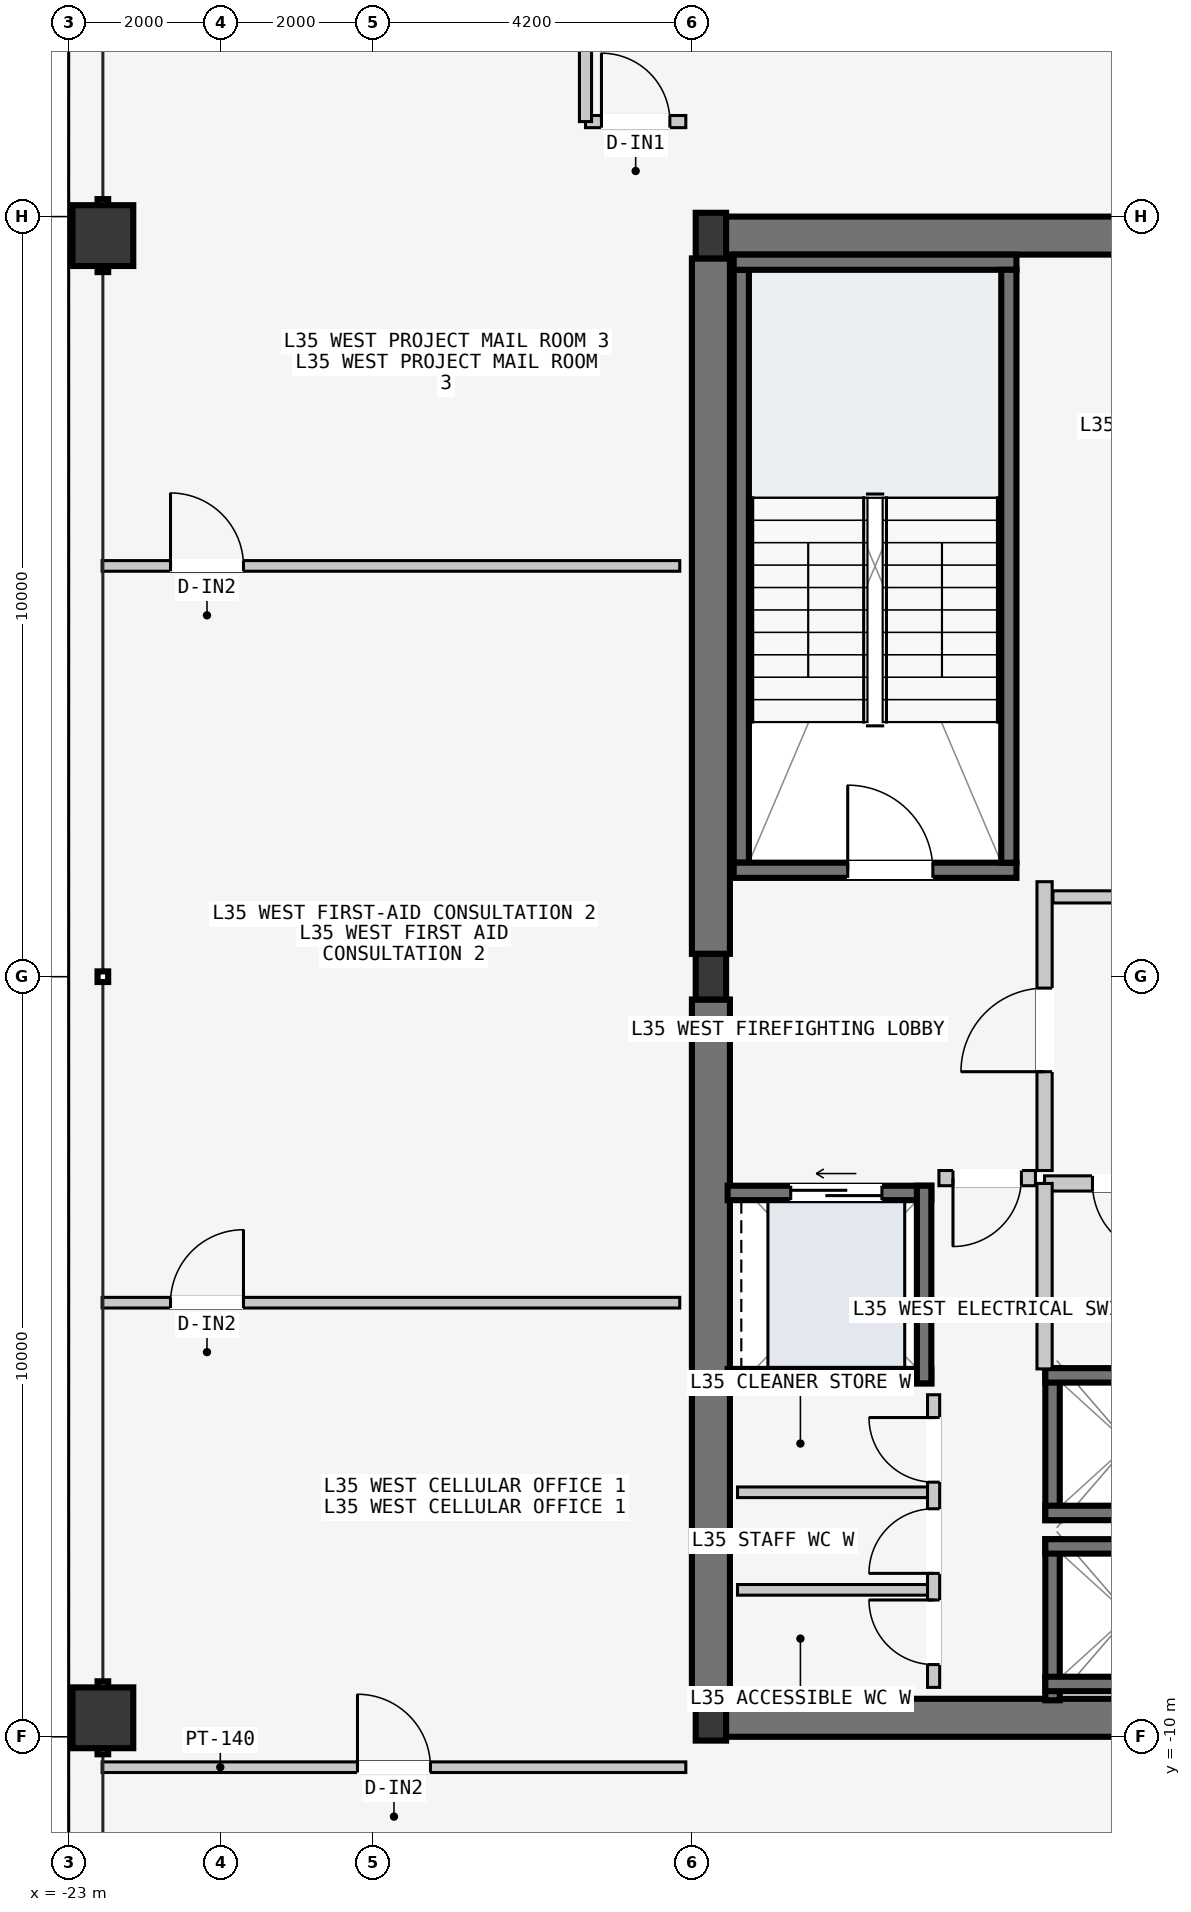
"""IFC4 building model, lengths in metres.
Left out: names, types, materials, properties, quantities, classifications, styles, units other than length and angle.
Written with IfcOpenShell. Run it as: python <this file> out.ifc"""

import sys

from ifc_helpers import new_model, si_unit, direction, frame, frame_2d, origin, origin_2d, place, context, subcontext, project, spatial, rectangle, hollow_rectangle, i_section, extrude, element, fill, save


model = new_model("IFC4")
c1 = context("Model", 3, precision=1e-05, world=origin(), true_north=direction((0.0, 1.0)))
c2 = subcontext(c1, "Body", "Model", "MODEL_VIEW")
j1 = project(units=[si_unit("LENGTHUNIT", "METRE"), si_unit("PLANEANGLEUNIT", "RADIAN")], contexts=[c1])
p1 = place(None, origin())
s1 = spatial("IfcSite", under=j1, at=p1, CompositionType="ELEMENT")
p2 = place(p1, origin())
s2 = spatial("IfcBuilding", under=s1, at=p2, CompositionType="ELEMENT")
p3 = place(p2, frame((0.0, 0.0, 135.0)))
s3 = spatial("IfcBuildingStorey", under=s2, at=p3, CompositionType="ELEMENT", Elevation=135.0)
for number, where, z_axis, x_axis in (
    (1, (-14.53, -9.75, -0.2), (0.0, 0.0, 1.0), (1.0, 0.0, 0.0)),
    (2, (-14.53, 9.75, -0.2), (0.0, 0.0, 1.0), (1.0, 0.0, 0.0)),
):
    element("IfcWall", number, at=place(p3, frame(where, z_axis=z_axis, x_axis=x_axis)), inside=s3, PredefinedType="SHEAR", context=c2, shape_type="SweptSolid", body=[
        extrude(rectangle(XDim=6.46, YDim=0.5, at=frame_2d((3.23, 0.0))), origin(), (0.0, 0.0, 1.0), 3.6),
    ])
for number, where, z_axis, x_axis in (
    (3, (-14.55, -9.45, -0.2), (0.0, 0.0, 1.0), (0.0, 1.0, 0.0)),
    (4, (-14.55, 0.3, -0.2), (0.0, 0.0, 1.0), (0.0, 1.0, 0.0)),
):
    element("IfcWall", number, at=place(p3, frame(where, z_axis=z_axis, x_axis=x_axis)), inside=s3, PredefinedType="SHEAR", context=c2, shape_type="SweptSolid", body=[
        extrude(rectangle(XDim=9.15, YDim=0.5, at=frame_2d((4.575, 0.0))), origin(), (0.0, 0.0, 1.0), 3.6),
    ])
p4 = place(p3, frame((-14.15, 1.5, -0.2), z_axis=(0.0, 0.0, 1.0), x_axis=(0.0, 1.0, 0.0)))
e5 = element("IfcWall", 5, at=p4, inside=s3, PredefinedType="SOLIDWALL", context=c2, shape_type="SweptSolid", body=[
    extrude(rectangle(XDim=7.8, YDim=0.2, at=frame_2d((3.9, 0.0))), origin(), (0.0, 0.0, 1.0), 3.6),
])
p5 = place(p3, frame((-14.25, 1.4, -0.2), z_axis=(0.0, 0.0, 1.0), x_axis=(1.0, 0.0, 0.0)))
e6 = element("IfcWall", 6, at=p5, inside=s3, PredefinedType="SOLIDWALL", context=c2, shape_type="SweptSolid", body=[
    extrude(rectangle(XDim=3.72, YDim=0.2, at=frame_2d((1.86, 0.0))), origin(), (0.0, 0.0, 1.0), 3.6),
])
p6 = place(p5, frame((1.5, 0.0, 0.2)))
e7 = element("IfcOpeningElement", 7, at=p6, cuts=e6, PredefinedType="OPENING", context=c2, shape_type="SweptSolid", body=[
    extrude(rectangle(XDim=1.12, YDim=2.18, at=frame_2d((0.56, 1.09))), frame((0.0, 0.11, 0.0), z_axis=(0.0, -1.0, 0.0), x_axis=(1.0, 0.0, 0.0)), (0.0, 0.0, 1.0), 0.22),
])
p7 = place(p3, frame((-14.25, 9.4, -0.2), z_axis=(0.0, 0.0, 1.0), x_axis=(1.0, 0.0, 0.0)))
e8 = element("IfcWall", 8, at=p7, inside=s3, PredefinedType="SOLIDWALL", context=c2, shape_type="SweptSolid", body=[
    extrude(rectangle(XDim=3.72, YDim=0.2, at=frame_2d((1.86, 0.0))), origin(), (0.0, 0.0, 1.0), 3.6),
])
p8 = place(p3, frame((-10.63, 1.5, -0.2), z_axis=(0.0, 0.0, 1.0), x_axis=(0.0, 1.0, 0.0)))
e9 = element("IfcWall", 9, at=p8, inside=s3, PredefinedType="SOLIDWALL", context=c2, shape_type="SweptSolid", body=[
    extrude(rectangle(XDim=7.8, YDim=0.2, at=frame_2d((3.9, 0.0))), origin(), (0.0, 0.0, 1.0), 3.6),
])
for number, where, z_axis, x_axis in (
    (10, (-14.55, -9.75, 0.0), (0.0, 0.0, 1.0), (1.0, 0.0, 0.0)),
    (11, (-14.55, 0.0, 0.0), (0.0, 0.0, 1.0), (1.0, 0.0, 0.0)),
    (12, (-14.55, 9.75, 0.0), (0.0, 0.0, 1.0), (1.0, 0.0, 0.0)),
):
    element("IfcColumn", number, at=place(p3, frame(where, z_axis=z_axis, x_axis=x_axis)), inside=s3, PredefinedType="COLUMN", context=c2, shape_type="SweptSolid", body=[
        extrude(i_section(OverallWidth=0.4, OverallDepth=0.6, WebThickness=0.022, FlangeThickness=0.036, at=origin_2d()), origin(), (0.0, 0.0, 1.0), 3.6),
    ])
for number, where, z_axis, x_axis in (
    (13, (-22.55, -9.75, 0.0), (0.0, 0.0, 1.0), (0.0, 1.0, 0.0)),
    (14, (-22.55, 9.75, 0.0), (0.0, 0.0, 1.0), (0.0, 1.0, 0.0)),
):
    element("IfcColumn", number, at=place(p3, frame(where, z_axis=z_axis, x_axis=x_axis)), inside=s3, PredefinedType="COLUMN", context=c2, shape_type="SweptSolid", body=[
        extrude(hollow_rectangle(XDim=0.8, YDim=0.8, WallThickness=0.036, at=origin_2d()), origin(), (0.0, 0.0, 1.0), 3.6),
    ])
p9 = place(p3, frame((-10.055, -9.52, -0.2), z_axis=(0.0, 0.0, 1.0), x_axis=(0.0, 1.0, 0.0)))
e15 = element("IfcWall", 15, at=p9, inside=s3, PredefinedType="SOLIDWALL", context=c2, shape_type="SweptSolid", body=[
    extrude(rectangle(XDim=2.12, YDim=0.19, at=frame_2d((1.06, 0.0))), origin(), (0.0, 0.0, 1.0), 3.6),
])
for number, where, z_axis, x_axis in (
    (16, (-10.15, -7.495, -0.2), (0.0, 0.0, 1.0), (1.0, 0.0, 0.0)),
    (17, (-10.15, -9.305, -0.2), (0.0, 0.0, 1.0), (1.0, 0.0, 0.0)),
):
    element("IfcWall", number, at=place(p3, frame(where, z_axis=z_axis, x_axis=x_axis)), inside=s3, PredefinedType="SOLIDWALL", context=c2, shape_type="SweptSolid", body=[
        extrude(rectangle(XDim=2.2, YDim=0.19, at=frame_2d((1.1, 0.0))), origin(), (0.0, 0.0, 1.0), 3.6),
    ])
p10 = place(p3, frame((-10.055, -7.15, -0.2), z_axis=(0.0, 0.0, 1.0), x_axis=(0.0, 1.0, 0.0)))
e18 = element("IfcWall", 18, at=p10, inside=s3, PredefinedType="SOLIDWALL", context=c2, shape_type="SweptSolid", body=[
    extrude(rectangle(XDim=2.0, YDim=0.19, at=frame_2d((1.0, 0.0))), origin(), (0.0, 0.0, 1.0), 3.6),
])
for number, where, z_axis, x_axis in (
    (19, (-10.15, -5.245, -0.2), (0.0, 0.0, 1.0), (1.0, 0.0, 0.0)),
    (20, (-10.15, -7.055, -0.2), (0.0, 0.0, 1.0), (1.0, 0.0, 0.0)),
):
    element("IfcWall", number, at=place(p3, frame(where, z_axis=z_axis, x_axis=x_axis)), inside=s3, PredefinedType="SOLIDWALL", context=c2, shape_type="SweptSolid", body=[
        extrude(rectangle(XDim=2.2, YDim=0.19, at=frame_2d((1.1, 0.0))), origin(), (0.0, 0.0, 1.0), 3.6),
    ])
p11 = place(p3, frame((-14.33, -2.845, -0.2), z_axis=(0.0, 0.0, 1.0), x_axis=(1.0, 0.0, 0.0)))
e21 = element("IfcWall", 21, at=p11, inside=s3, PredefinedType="SOLIDWALL", context=c2, shape_type="SweptSolid", body=[
    extrude(rectangle(XDim=2.68, YDim=0.19, at=frame_2d((1.34, 0.0))), origin(), (0.0, 0.0, 1.0), 3.6),
])
p12 = place(p11, frame((0.83, 0.0, 0.2)))
e22 = element("IfcOpeningElement", 22, at=p12, cuts=e21, PredefinedType="OPENING", context=c2, shape_type="SweptSolid", body=[
    extrude(rectangle(XDim=1.2, YDim=2.2, at=frame_2d((0.6, 1.1))), frame((0.0, 0.105, 0.0), z_axis=(0.0, -1.0, 0.0), x_axis=(1.0, 0.0, 0.0)), (0.0, 0.0, 1.0), 0.21),
])
p13 = place(p3, frame((-14.33, -5.255, -0.2), z_axis=(0.0, 0.0, 1.0), x_axis=(1.0, 0.0, 0.0)))
e23 = element("IfcWall", 23, at=p13, inside=s3, PredefinedType="SOLIDWALL", context=c2, shape_type="SweptSolid", body=[
    extrude(rectangle(XDim=2.68, YDim=0.19, at=frame_2d((1.34, 0.0))), origin(), (0.0, 0.0, 1.0), 3.6),
])
p14 = place(p3, frame((-11.745, -5.35, -0.2), z_axis=(0.0, 0.0, 1.0), x_axis=(0.0, 1.0, 0.0)))
e24 = element("IfcWall", 24, at=p14, inside=s3, PredefinedType="SOLIDWALL", context=c2, shape_type="SweptSolid", body=[
    extrude(rectangle(XDim=2.6, YDim=0.19, at=frame_2d((1.3, 0.0))), origin(), (0.0, 0.0, 1.0), 3.6),
])
p15 = place(p3, frame((-10.16, -2.55, 0.0), z_axis=(0.0, 0.0, 1.0), x_axis=(0.0, 1.0, 0.0)))
e25 = element("IfcWall", 25, at=p15, inside=s3, PredefinedType="PARTITIONING", context=c2, shape_type="SweptSolid", body=[
    extrude(rectangle(XDim=3.8, YDim=0.2, at=frame_2d((1.9, 0.0))), origin(), (0.0, 0.0, 1.0), 3.4),
])
p16 = place(p15, frame((1.3, 0.0, 0.0)))
e26 = element("IfcOpeningElement", 26, at=p16, cuts=e25, PredefinedType="OPENING", context=c2, shape_type="SweptSolid", body=[
    extrude(rectangle(XDim=1.1, YDim=2.15, at=frame_2d((0.55, 1.075))), frame((0.0, 0.11, 0.0), z_axis=(0.0, -1.0, 0.0), x_axis=(1.0, 0.0, 0.0)), (0.0, 0.0, 1.0), 0.22),
])
p17 = place(p3, frame((-10.28, -2.65, 0.0), z_axis=(0.0, 0.0, 1.0), x_axis=(-1.0, 0.0, 0.0)))
e27 = element("IfcWall", 27, at=p17, inside=s3, PredefinedType="PARTITIONING", context=c2, shape_type="SweptSolid", body=[
    extrude(rectangle(XDim=1.27, YDim=0.2, at=frame_2d((0.635, 0.0))), origin(), (0.0, 0.0, 1.0), 3.4),
])
p18 = place(p17, frame((0.185, 0.0, 0.0)))
e28 = element("IfcOpeningElement", 28, at=p18, cuts=e27, PredefinedType="OPENING", context=c2, shape_type="SweptSolid", body=[
    extrude(rectangle(XDim=0.9, YDim=2.15, at=frame_2d((0.45, 1.075))), frame((0.0, 0.11, 0.0), z_axis=(0.0, -1.0, 0.0), x_axis=(1.0, 0.0, 0.0)), (0.0, 0.0, 1.0), 0.22),
])
p19 = place(p3, frame((-7.96, -2.72, 0.0), z_axis=(0.0, 0.0, 1.0), x_axis=(-1.0, 0.0, 0.0)))
e29 = element("IfcWall", 29, at=p19, inside=s3, PredefinedType="PARTITIONING", context=c2, shape_type="SweptSolid", body=[
    extrude(rectangle(XDim=2.2, YDim=0.2, at=frame_2d((1.1, 0.0))), origin(), (0.0, 0.0, 1.0), 3.4),
])
p20 = place(p19, frame((0.62, 0.0, 0.0)))
e30 = element("IfcOpeningElement", 30, at=p20, cuts=e29, PredefinedType="OPENING", context=c2, shape_type="SweptSolid", body=[
    extrude(rectangle(XDim=0.95, YDim=2.1, at=frame_2d((0.475, 1.05))), frame((0.0, 0.11, 0.0), z_axis=(0.0, -1.0, 0.0), x_axis=(1.0, 0.0, 0.0)), (0.0, 0.0, 1.0), 0.22),
])
p21 = place(p3, frame((-10.16, -5.16, 0.0), z_axis=(0.0, 0.0, 1.0), x_axis=(0.0, 1.0, 0.0)))
e31 = element("IfcWall", 31, at=p21, inside=s3, PredefinedType="PARTITIONING", context=c2, shape_type="SweptSolid", body=[
    extrude(rectangle(XDim=2.44, YDim=0.2, at=frame_2d((1.22, 0.0))), origin(), (0.0, 0.0, 1.0), 3.4),
])
for number, where, z_axis, x_axis in (
    (32, (-11.7, -8.067, 0.0), (0.0, 0.0, 1.0), (-1.0, 0.0, 0.0)),
    (33, (-11.7, -6.783, 0.0), (0.0, 0.0, 1.0), (-1.0, 0.0, 0.0)),
):
    element("IfcWall", number, at=place(p3, frame(where, z_axis=z_axis, x_axis=x_axis)), inside=s3, PredefinedType="PARTITIONING", context=c2, shape_type="SweptSolid", body=[
        extrude(rectangle(XDim=2.5, YDim=0.14, at=frame_2d((1.25, 0.0))), origin(), (0.0, 0.0, 1.0), 3.4),
    ])
p22 = place(p3, frame((-11.62, -9.35, 0.0), z_axis=(0.0, 0.0, 1.0), x_axis=(0.0, 1.0, 0.0)))
e34 = element("IfcWall", 34, at=p22, inside=s3, PredefinedType="PARTITIONING", context=c2, shape_type="SweptSolid", body=[
    extrude(rectangle(XDim=3.85, YDim=0.16, at=frame_2d((1.925, 0.0))), origin(), (0.0, 0.0, 1.0), 3.4),
])
p23 = place(p22, frame((0.3, 0.0, 0.0)))
e35 = element("IfcOpeningElement", 35, at=p23, cuts=e34, PredefinedType="OPENING", context=c2, shape_type="SweptSolid", body=[
    extrude(rectangle(XDim=0.85, YDim=2.12, at=frame_2d((0.425, 1.06))), frame((0.0, 0.09, 0.0), z_axis=(0.0, -1.0, 0.0), x_axis=(1.0, 0.0, 0.0)), (0.0, 0.0, 1.0), 0.18),
])
p24 = place(p22, frame((1.5, 0.0, 0.0)))
e36 = element("IfcOpeningElement", 36, at=p24, cuts=e34, PredefinedType="OPENING", context=c2, shape_type="SweptSolid", body=[
    extrude(rectangle(XDim=0.85, YDim=2.12, at=frame_2d((0.425, 1.06))), frame((0.0, 0.09, 0.0), z_axis=(0.0, -1.0, 0.0), x_axis=(1.0, 0.0, 0.0)), (0.0, 0.0, 1.0), 0.18),
])
p25 = place(p22, frame((2.7, 0.0, 0.0)))
e37 = element("IfcOpeningElement", 37, at=p25, cuts=e34, PredefinedType="OPENING", context=c2, shape_type="SweptSolid", body=[
    extrude(rectangle(XDim=0.85, YDim=2.12, at=frame_2d((0.425, 1.06))), frame((0.0, 0.09, 0.0), z_axis=(0.0, -1.0, 0.0), x_axis=(1.0, 0.0, 0.0)), (0.0, 0.0, 1.0), 0.18),
])
p26 = place(p3, frame((-10.05, 1.05, 0.0), z_axis=(0.0, 0.0, 1.0), x_axis=(1.0, 0.0, 0.0)))
e38 = element("IfcWall", 38, at=p26, inside=s3, PredefinedType="PARTITIONING", context=c2, shape_type="SweptSolid", body=[
    extrude(rectangle(XDim=6.21, YDim=0.16, at=frame_2d((3.105, 0.0))), origin(), (0.0, 0.0, 1.0), 3.4),
])
p27 = place(p3, frame((-22.56, -10.4, 0.0), z_axis=(0.0, 0.0, 1.0), x_axis=(1.0, 0.0, 0.0)))
e39 = element("IfcWall", 39, at=p27, inside=s3, PredefinedType="PARTITIONING", context=c2, shape_type="SweptSolid", body=[
    extrude(rectangle(XDim=7.68, YDim=0.14, at=frame_2d((3.84, 0.0))), origin(), (0.0, 0.0, 1.0), 3.4),
])
p28 = place(p27, frame((3.36, 0.0, 0.0)))
e40 = element("IfcOpeningElement", 40, at=p28, cuts=e39, PredefinedType="OPENING", context=c2, shape_type="SweptSolid", body=[
    extrude(rectangle(XDim=0.96, YDim=2.18, at=frame_2d((0.48, 1.09))), frame((0.0, 0.08, 0.0), z_axis=(0.0, -1.0, 0.0), x_axis=(1.0, 0.0, 0.0)), (0.0, 0.0, 1.0), 0.16),
])
p29 = place(p3, frame((-16.2, 11.25, 0.0), z_axis=(0.0, 0.0, 1.0), x_axis=(1.0, 0.0, 0.0)))
e41 = element("IfcWall", 41, at=p29, inside=s3, PredefinedType="PARTITIONING", context=c2, shape_type="SweptSolid", body=[
    extrude(rectangle(XDim=1.32, YDim=0.16, at=frame_2d((0.66, 0.0))), origin(), (0.0, 0.0, 1.0), 3.4),
])
p30 = place(p29, frame((0.21, 0.0, 0.0)))
e42 = element("IfcOpeningElement", 42, at=p30, cuts=e41, PredefinedType="OPENING", context=c2, shape_type="SweptSolid", body=[
    extrude(rectangle(XDim=0.9, YDim=2.15, at=frame_2d((0.45, 1.075))), frame((0.0, 0.09, 0.0), z_axis=(0.0, -1.0, 0.0), x_axis=(1.0, 0.0, 0.0)), (0.0, 0.0, 1.0), 0.18),
])
p31 = place(p3, frame((-16.2, 11.25, 0.0), z_axis=(0.0, 0.0, 1.0), x_axis=(0.0, 1.0, 0.0)))
e43 = element("IfcWall", 43, at=p31, inside=s3, PredefinedType="PARTITIONING", context=c2, shape_type="SweptSolid", body=[
    extrude(rectangle(XDim=1.95, YDim=0.16, at=frame_2d((0.975, 0.0))), origin(), (0.0, 0.0, 1.0), 3.4),
])
p32 = place(p3, frame((-22.56, -4.289, 0.0), z_axis=(0.0, 0.0, 1.0), x_axis=(1.0, 0.0, 0.0)))
e44 = element("IfcWall", 44, at=p32, inside=s3, PredefinedType="PARTITIONING", context=c2, shape_type="SweptSolid", body=[
    extrude(rectangle(XDim=7.6, YDim=0.14, at=frame_2d((3.8, 0.0))), origin(), (0.0, 0.0, 1.0), 3.4),
])
p33 = place(p32, frame((0.9, 0.0, 0.0)))
e45 = element("IfcOpeningElement", 45, at=p33, cuts=e44, PredefinedType="OPENING", context=c2, shape_type="SweptSolid", body=[
    extrude(rectangle(XDim=0.96, YDim=2.18, at=frame_2d((0.48, 1.09))), frame((0.0, 0.08, 0.0), z_axis=(0.0, -1.0, 0.0), x_axis=(1.0, 0.0, 0.0)), (0.0, 0.0, 1.0), 0.16),
])
p34 = place(p3, frame((-22.56, 5.404, 0.0), z_axis=(0.0, 0.0, 1.0), x_axis=(1.0, 0.0, 0.0)))
e46 = element("IfcWall", 46, at=p34, inside=s3, PredefinedType="PARTITIONING", context=c2, shape_type="SweptSolid", body=[
    extrude(rectangle(XDim=7.6, YDim=0.14, at=frame_2d((3.8, 0.0))), origin(), (0.0, 0.0, 1.0), 3.4),
])
p35 = place(p34, frame((0.9, 0.0, 0.0)))
e47 = element("IfcOpeningElement", 47, at=p35, cuts=e46, PredefinedType="OPENING", context=c2, shape_type="SweptSolid", body=[
    extrude(rectangle(XDim=0.96, YDim=2.18, at=frame_2d((0.48, 1.09))), frame((0.0, 0.08, 0.0), z_axis=(0.0, -1.0, 0.0), x_axis=(1.0, 0.0, 0.0)), (0.0, 0.0, 1.0), 0.16),
])
p36 = place(p6, origin())
e48 = element("IfcDoor", 48, at=p36, inside=s3, OperationType="SINGLE_SWING_LEFT", PredefinedType="DOOR", context=c2, shape_type="SweptSolid", body=[
    extrude(rectangle(XDim=1.12, YDim=2.18, at=frame_2d((0.56, 1.09))), frame((0.0, 0.025, 0.0), z_axis=(0.0, -1.0, 0.0), x_axis=(1.0, 0.0, 0.0)), (0.0, 0.0, 1.0), 0.05),
])
fill(e7, e48)
p37 = place(p12, origin())
e49 = element("IfcDoor", 49, at=p37, inside=s3, OperationType="SLIDING_TO_LEFT", PredefinedType="DOOR", context=c2, shape_type="SweptSolid", body=[
    extrude(rectangle(XDim=1.2, YDim=2.2, at=frame_2d((0.6, 1.1))), frame((0.0, 0.025, 0.0), z_axis=(0.0, -1.0, 0.0), x_axis=(1.0, 0.0, 0.0)), (0.0, 0.0, 1.0), 0.05),
])
fill(e22, e49)
p38 = place(p16, origin())
e50 = element("IfcDoor", 50, at=p38, inside=s3, OperationType="SINGLE_SWING_LEFT", PredefinedType="DOOR", context=c2, shape_type="SweptSolid", body=[
    extrude(rectangle(XDim=1.1, YDim=2.15, at=frame_2d((0.55, 1.075))), frame((0.0, 0.025, 0.0), z_axis=(0.0, -1.0, 0.0), x_axis=(1.0, 0.0, 0.0)), (0.0, 0.0, 1.0), 0.05),
])
fill(e26, e50)
p39 = place(p18, origin())
e51 = element("IfcDoor", 51, at=p39, inside=s3, OperationType="SINGLE_SWING_RIGHT", PredefinedType="DOOR", context=c2, shape_type="SweptSolid", body=[
    extrude(rectangle(XDim=0.9, YDim=2.15, at=frame_2d((0.45, 1.075))), frame((0.0, 0.025, 0.0), z_axis=(0.0, -1.0, 0.0), x_axis=(1.0, 0.0, 0.0)), (0.0, 0.0, 1.0), 0.05),
])
fill(e28, e51)
p40 = place(p20, origin())
e52 = element("IfcDoor", 52, at=p40, inside=s3, OperationType="SINGLE_SWING_LEFT", PredefinedType="DOOR", context=c2, shape_type="SweptSolid", body=[
    extrude(rectangle(XDim=0.95, YDim=2.1, at=frame_2d((0.475, 1.05))), frame((0.0, 0.025, 0.0), z_axis=(0.0, -1.0, 0.0), x_axis=(1.0, 0.0, 0.0)), (0.0, 0.0, 1.0), 0.05),
])
fill(e30, e52)
p41 = place(p23, origin())
e53 = element("IfcDoor", 53, at=p41, inside=s3, OperationType="SINGLE_SWING_RIGHT", PredefinedType="DOOR", context=c2, shape_type="SweptSolid", body=[
    extrude(rectangle(XDim=0.85, YDim=2.12, at=frame_2d((0.425, 1.06))), frame((0.0, 0.025, 0.0), z_axis=(0.0, -1.0, 0.0), x_axis=(1.0, 0.0, 0.0)), (0.0, 0.0, 1.0), 0.05),
])
fill(e35, e53)
p42 = place(p24, origin())
e54 = element("IfcDoor", 54, at=p42, inside=s3, OperationType="SINGLE_SWING_LEFT", PredefinedType="DOOR", context=c2, shape_type="SweptSolid", body=[
    extrude(rectangle(XDim=0.85, YDim=2.12, at=frame_2d((0.425, 1.06))), frame((0.0, 0.025, 0.0), z_axis=(0.0, -1.0, 0.0), x_axis=(1.0, 0.0, 0.0)), (0.0, 0.0, 1.0), 0.05),
])
fill(e36, e54)
p43 = place(p25, origin())
e55 = element("IfcDoor", 55, at=p43, inside=s3, OperationType="SINGLE_SWING_RIGHT", PredefinedType="DOOR", context=c2, shape_type="SweptSolid", body=[
    extrude(rectangle(XDim=0.85, YDim=2.12, at=frame_2d((0.425, 1.06))), frame((0.0, 0.025, 0.0), z_axis=(0.0, -1.0, 0.0), x_axis=(1.0, 0.0, 0.0)), (0.0, 0.0, 1.0), 0.05),
])
fill(e37, e55)
p44 = place(p28, origin())
e56 = element("IfcDoor", 56, at=p44, inside=s3, OperationType="SINGLE_SWING_LEFT", PredefinedType="DOOR", context=c2, shape_type="SweptSolid", body=[
    extrude(rectangle(XDim=0.96, YDim=2.18, at=frame_2d((0.48, 1.09))), frame((0.0, 0.025, 0.0), z_axis=(0.0, -1.0, 0.0), x_axis=(1.0, 0.0, 0.0)), (0.0, 0.0, 1.0), 0.05),
])
fill(e40, e56)
p45 = place(p30, origin())
e57 = element("IfcDoor", 57, at=p45, inside=s3, OperationType="SINGLE_SWING_LEFT", PredefinedType="DOOR", context=c2, shape_type="SweptSolid", body=[
    extrude(rectangle(XDim=0.9, YDim=2.15, at=frame_2d((0.45, 1.075))), frame((0.0, 0.025, 0.0), z_axis=(0.0, -1.0, 0.0), x_axis=(1.0, 0.0, 0.0)), (0.0, 0.0, 1.0), 0.05),
])
fill(e42, e57)
p46 = place(p33, origin())
e58 = element("IfcDoor", 58, at=p46, inside=s3, OperationType="SINGLE_SWING_RIGHT", PredefinedType="DOOR", context=c2, shape_type="SweptSolid", body=[
    extrude(rectangle(XDim=0.96, YDim=2.18, at=frame_2d((0.48, 1.09))), frame((0.0, 0.025, 0.0), z_axis=(0.0, -1.0, 0.0), x_axis=(1.0, 0.0, 0.0)), (0.0, 0.0, 1.0), 0.05),
])
fill(e45, e58)
p47 = place(p35, origin())
e59 = element("IfcDoor", 59, at=p47, inside=s3, OperationType="SINGLE_SWING_LEFT", PredefinedType="DOOR", context=c2, shape_type="SweptSolid", body=[
    extrude(rectangle(XDim=0.96, YDim=2.18, at=frame_2d((0.48, 1.09))), frame((0.0, 0.025, 0.0), z_axis=(0.0, -1.0, 0.0), x_axis=(1.0, 0.0, 0.0)), (0.0, 0.0, 1.0), 0.05),
])
fill(e47, e59)
save(model, sys.argv[1])
